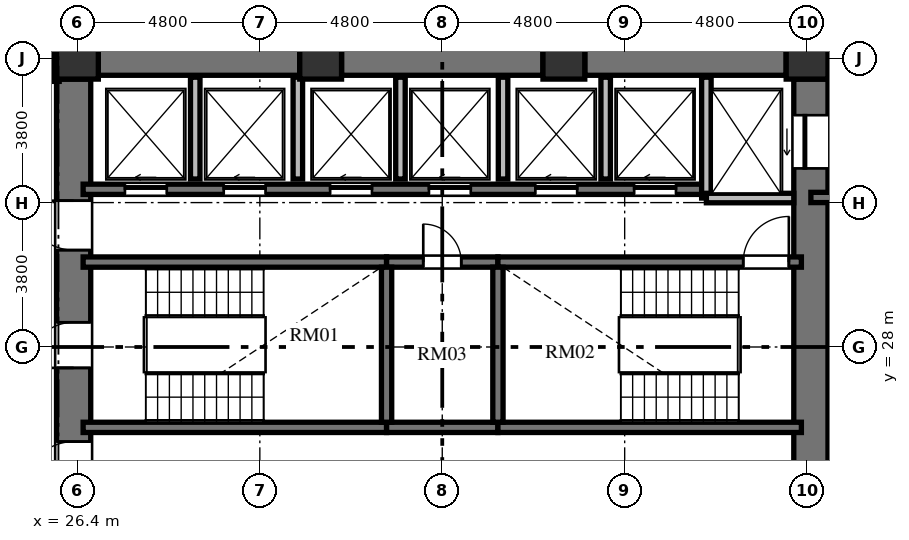
"""IFC4 building model, lengths in metres.
Left out: names, types, materials, properties, quantities, classifications, styles, units other than length and angle.
Written with IfcOpenShell. Run it as: python <this file> out.ifc"""

import sys

from ifc_helpers import new_model, si_unit, direction, frame, frame_2d, origin, origin_2d, place, context, subcontext, project, spatial, rectangle, extrude, element, fill, save


model = new_model("IFC4")
c1 = context("Model", 3, precision=1e-05, world=origin(), true_north=direction((0.0, 1.0)))
c2 = subcontext(c1, "Body", "Model", "MODEL_VIEW")
j1 = project(units=[si_unit("LENGTHUNIT", "METRE"), si_unit("PLANEANGLEUNIT", "RADIAN")], contexts=[c1])
p1 = place(None, origin())
s1 = spatial("IfcSite", under=j1, at=p1, CompositionType="ELEMENT")
p2 = place(p1, origin())
s2 = spatial("IfcBuilding", under=s1, at=p2, CompositionType="ELEMENT")
p3 = place(p2, frame((0.0, 0.0, 25.2)))
s3 = spatial("IfcBuildingStorey", under=s2, at=p3, CompositionType="ELEMENT", Elevation=25.2)
for number, where, z_axis, x_axis in (
    (1, (45.6, 35.6, 0.0), (0.0, 0.0, 1.0), (1.0, 0.0, 0.0)),
    (2, (39.2, 35.6, 0.0), (0.0, 0.0, 1.0), (1.0, 0.0, 0.0)),
    (3, (32.8, 35.6, 0.0), (0.0, 0.0, 1.0), (1.0, 0.0, 0.0)),
    (4, (26.4, 35.6, 0.0), (0.0, 0.0, 1.0), (1.0, 0.0, 0.0)),
):
    element("IfcColumn", number, at=place(p3, frame(where, z_axis=z_axis, x_axis=x_axis)), inside=s3, PredefinedType="COLUMN", context=c2, shape_type="SweptSolid", body=[
        extrude(rectangle(XDim=1.1, YDim=1.1, at=origin_2d()), origin(), (0.0, 0.0, 1.0), 3.648),
    ])
p4 = place(p3, frame((26.3, 20.95, 0.0), z_axis=(0.0, 0.0, 1.0), x_axis=(0.0, 1.0, 0.0)))
e5 = element("IfcWall", 5, at=p4, inside=s3, PredefinedType="SHEAR", context=c2, shape_type="SweptSolid", body=[
    extrude(rectangle(XDim=14.1, YDim=0.9, at=frame_2d((7.05, 0.0))), origin(), (0.0, 0.0, 1.0), 3.648),
])
p5 = place(p4, frame((6.5, 0.0, 0.0)))
e6 = element("IfcOpeningElement", 6, at=p5, cuts=e5, PredefinedType="OPENING", context=c2, shape_type="SweptSolid", body=[
    extrude(rectangle(XDim=1.2, YDim=2.15, at=frame_2d((0.6, 1.075))), frame((0.0, 0.46, 0.0), z_axis=(0.0, -1.0, 0.0), x_axis=(1.0, 0.0, 0.0)), (0.0, 0.0, 1.0), 0.92),
])
p6 = place(p4, frame((9.6, 0.0, 0.0)))
e7 = element("IfcOpeningElement", 7, at=p6, cuts=e5, PredefinedType="OPENING", context=c2, shape_type="SweptSolid", body=[
    extrude(rectangle(XDim=1.3, YDim=2.2, at=frame_2d((0.65, 1.1))), frame((0.0, 0.46, 0.0), z_axis=(0.0, -1.0, 0.0), x_axis=(1.0, 0.0, 0.0)), (0.0, 0.0, 1.0), 0.92),
])
p7 = place(p4, frame((3.26, 0.0, 0.0)))
e8 = element("IfcOpeningElement", 8, at=p7, cuts=e5, PredefinedType="OPENING", context=c2, shape_type="SweptSolid", body=[
    extrude(rectangle(XDim=1.3, YDim=2.2, at=frame_2d((0.65, 1.1))), frame((0.0, 0.46, 0.0), z_axis=(0.0, -1.0, 0.0), x_axis=(1.0, 0.0, 0.0)), (0.0, 0.0, 1.0), 0.92),
])
p8 = place(p3, frame((45.7, 20.95, 0.0), z_axis=(0.0, 0.0, 1.0), x_axis=(0.0, 1.0, 0.0)))
e9 = element("IfcWall", 9, at=p8, inside=s3, PredefinedType="SHEAR", context=c2, shape_type="SweptSolid", body=[
    extrude(rectangle(XDim=14.1, YDim=0.9, at=frame_2d((7.05, 0.0))), origin(), (0.0, 0.0, 1.0), 3.648),
])
p9 = place(p8, frame((11.75, 0.0, 0.0)))
e10 = element("IfcOpeningElement", 10, at=p9, cuts=e9, PredefinedType="OPENING", context=c2, shape_type="SweptSolid", body=[
    extrude(rectangle(XDim=1.4, YDim=2.3, at=frame_2d((0.7, 1.15))), frame((0.0, 0.46, 0.0), z_axis=(0.0, -1.0, 0.0), x_axis=(1.0, 0.0, 0.0)), (0.0, 0.0, 1.0), 0.92),
])
p10 = place(p8, frame((0.95, 0.0, 0.0)))
e11 = element("IfcOpeningElement", 11, at=p10, cuts=e9, PredefinedType="OPENING", context=c2, shape_type="SweptSolid", body=[
    extrude(rectangle(XDim=1.4, YDim=2.3, at=frame_2d((0.7, 1.15))), frame((0.0, 0.46, 0.0), z_axis=(0.0, -1.0, 0.0), x_axis=(1.0, 0.0, 0.0)), (0.0, 0.0, 1.0), 0.92),
])
p11 = place(p3, frame((26.95, 35.6, 0.0), z_axis=(0.0, 0.0, 1.0), x_axis=(1.0, 0.0, 0.0)))
e12 = element("IfcWall", 12, at=p11, inside=s3, PredefinedType="SHEAR", context=c2, shape_type="SweptSolid", body=[
    extrude(rectangle(XDim=5.3, YDim=0.9, at=frame_2d((2.65, 0.0))), origin(), (0.0, 0.0, 1.0), 3.648),
])
p12 = place(p3, frame((33.35, 35.6, 0.0), z_axis=(0.0, 0.0, 1.0), x_axis=(1.0, 0.0, 0.0)))
e13 = element("IfcWall", 13, at=p12, inside=s3, PredefinedType="SHEAR", context=c2, shape_type="SweptSolid", body=[
    extrude(rectangle(XDim=5.3, YDim=0.9, at=frame_2d((2.65, 0.0))), origin(), (0.0, 0.0, 1.0), 3.648),
])
p13 = place(p3, frame((39.75, 35.6, 0.0), z_axis=(0.0, 0.0, 1.0), x_axis=(1.0, 0.0, 0.0)))
e14 = element("IfcWall", 14, at=p13, inside=s3, PredefinedType="SHEAR", context=c2, shape_type="SweptSolid", body=[
    extrude(rectangle(XDim=5.3, YDim=0.9, at=frame_2d((2.65, 0.0))), origin(), (0.0, 0.0, 1.0), 3.648),
])
p14 = place(p3, frame((26.55, 30.235, 0.0), z_axis=(0.0, 0.0, 1.0), x_axis=(1.0, 0.0, 0.0)))
e15 = element("IfcWall", 15, at=p14, inside=s3, PredefinedType="SHEAR", context=c2, shape_type="SweptSolid", body=[
    extrude(rectangle(XDim=7.985, YDim=0.27, at=frame_2d((3.992, 0.0))), origin(), (0.0, 0.0, 1.0), 3.648),
])
p15 = place(p3, frame((34.535, 30.235, 0.0), z_axis=(0.0, 0.0, 1.0), x_axis=(1.0, 0.0, 0.0)))
e16 = element("IfcWall", 16, at=p15, inside=s3, PredefinedType="SHEAR", context=c2, shape_type="SweptSolid", body=[
    extrude(rectangle(XDim=2.93, YDim=0.27, at=frame_2d((1.465, 0.0))), origin(), (0.0, 0.0, 1.0), 3.648),
])
p16 = place(p15, frame((0.965, 0.0, 0.0)))
e17 = element("IfcOpeningElement", 17, at=p16, cuts=e16, PredefinedType="OPENING", context=c2, shape_type="SweptSolid", body=[
    extrude(rectangle(XDim=1.0, YDim=2.1, at=frame_2d((0.5, 1.05))), frame((0.0, 0.145, 0.0), z_axis=(0.0, -1.0, 0.0), x_axis=(1.0, 0.0, 0.0)), (0.0, 0.0, 1.0), 0.29),
])
p17 = place(p3, frame((37.465, 30.235, 0.0), z_axis=(0.0, 0.0, 1.0), x_axis=(1.0, 0.0, 0.0)))
e18 = element("IfcWall", 18, at=p17, inside=s3, PredefinedType="SHEAR", context=c2, shape_type="SweptSolid", body=[
    extrude(rectangle(XDim=7.985, YDim=0.27, at=frame_2d((3.992, 0.0))), origin(), (0.0, 0.0, 1.0), 3.648),
])
p18 = place(p17, frame((6.455, 0.0, 0.0)))
e19 = element("IfcOpeningElement", 19, at=p18, cuts=e18, PredefinedType="OPENING", context=c2, shape_type="SweptSolid", body=[
    extrude(rectangle(XDim=1.2, YDim=2.15, at=frame_2d((0.6, 1.075))), frame((0.0, 0.145, 0.0), z_axis=(0.0, -1.0, 0.0), x_axis=(1.0, 0.0, 0.0)), (0.0, 0.0, 1.0), 0.29),
])
p19 = place(p3, frame((26.55, 25.885, 0.0), z_axis=(0.0, 0.0, 1.0), x_axis=(1.0, 0.0, 0.0)))
e20 = element("IfcWall", 20, at=p19, inside=s3, PredefinedType="SHEAR", context=c2, shape_type="SweptSolid", body=[
    extrude(rectangle(XDim=7.985, YDim=0.27, at=frame_2d((3.992, 0.0))), origin(), (0.0, 0.0, 1.0), 3.648),
])
p20 = place(p3, frame((34.535, 25.885, 0.0), z_axis=(0.0, 0.0, 1.0), x_axis=(1.0, 0.0, 0.0)))
e21 = element("IfcWall", 21, at=p20, inside=s3, PredefinedType="SHEAR", context=c2, shape_type="SweptSolid", body=[
    extrude(rectangle(XDim=2.93, YDim=0.27, at=frame_2d((1.465, 0.0))), origin(), (0.0, 0.0, 1.0), 3.648),
])
p21 = place(p3, frame((37.465, 25.885, 0.0), z_axis=(0.0, 0.0, 1.0), x_axis=(1.0, 0.0, 0.0)))
e22 = element("IfcWall", 22, at=p21, inside=s3, PredefinedType="SHEAR", context=c2, shape_type="SweptSolid", body=[
    extrude(rectangle(XDim=7.985, YDim=0.27, at=frame_2d((3.992, 0.0))), origin(), (0.0, 0.0, 1.0), 3.648),
])
for number, where, z_axis, x_axis in (
    (23, (34.535, 26.02, 0.0), (0.0, 0.0, 1.0), (0.0, 1.0, 0.0)),
    (24, (37.465, 26.02, 0.0), (0.0, 0.0, 1.0), (0.0, 1.0, 0.0)),
):
    element("IfcWall", number, at=place(p3, frame(where, z_axis=z_axis, x_axis=x_axis)), inside=s3, PredefinedType="SHEAR", context=c2, shape_type="SweptSolid", body=[
        extrude(rectangle(XDim=4.08, YDim=0.27, at=frame_2d((2.04, 0.0))), origin(), (0.0, 0.0, 1.0), 3.648),
    ])
p22 = place(p3, frame((26.55, 32.15, 0.0), z_axis=(0.0, 0.0, 1.0), x_axis=(1.0, 0.0, 0.0)))
e25 = element("IfcWall", 25, at=p22, inside=s3, PredefinedType="SHEAR", context=c2, shape_type="SweptSolid", body=[
    extrude(rectangle(XDim=16.4, YDim=0.27, at=frame_2d((8.2, 0.0))), origin(), (0.0, 0.0, 1.0), 3.648),
])
p23 = place(p22, frame((1.1, 0.0, 0.0)))
e26 = element("IfcOpeningElement", 26, at=p23, cuts=e25, PredefinedType="OPENING", context=c2, shape_type="SweptSolid", body=[
    extrude(rectangle(XDim=1.1, YDim=2.2, at=frame_2d((0.55, 1.1))), frame((0.0, 0.145, 0.0), z_axis=(0.0, -1.0, 0.0), x_axis=(1.0, 0.0, 0.0)), (0.0, 0.0, 1.0), 0.29),
])
p24 = place(p22, frame((3.7, 0.0, 0.0)))
e27 = element("IfcOpeningElement", 27, at=p24, cuts=e25, PredefinedType="OPENING", context=c2, shape_type="SweptSolid", body=[
    extrude(rectangle(XDim=1.1, YDim=2.2, at=frame_2d((0.55, 1.1))), frame((0.0, 0.145, 0.0), z_axis=(0.0, -1.0, 0.0), x_axis=(1.0, 0.0, 0.0)), (0.0, 0.0, 1.0), 0.29),
])
p25 = place(p22, frame((6.5, 0.0, 0.0)))
e28 = element("IfcOpeningElement", 28, at=p25, cuts=e25, PredefinedType="OPENING", context=c2, shape_type="SweptSolid", body=[
    extrude(rectangle(XDim=1.1, YDim=2.2, at=frame_2d((0.55, 1.1))), frame((0.0, 0.145, 0.0), z_axis=(0.0, -1.0, 0.0), x_axis=(1.0, 0.0, 0.0)), (0.0, 0.0, 1.0), 0.29),
])
p26 = place(p22, frame((9.1, 0.0, 0.0)))
e29 = element("IfcOpeningElement", 29, at=p26, cuts=e25, PredefinedType="OPENING", context=c2, shape_type="SweptSolid", body=[
    extrude(rectangle(XDim=1.1, YDim=2.2, at=frame_2d((0.55, 1.1))), frame((0.0, 0.145, 0.0), z_axis=(0.0, -1.0, 0.0), x_axis=(1.0, 0.0, 0.0)), (0.0, 0.0, 1.0), 0.29),
])
p27 = place(p22, frame((11.9, 0.0, 0.0)))
e30 = element("IfcOpeningElement", 30, at=p27, cuts=e25, PredefinedType="OPENING", context=c2, shape_type="SweptSolid", body=[
    extrude(rectangle(XDim=1.1, YDim=2.2, at=frame_2d((0.55, 1.1))), frame((0.0, 0.145, 0.0), z_axis=(0.0, -1.0, 0.0), x_axis=(1.0, 0.0, 0.0)), (0.0, 0.0, 1.0), 0.29),
])
p28 = place(p22, frame((14.5, 0.0, 0.0)))
e31 = element("IfcOpeningElement", 31, at=p28, cuts=e25, PredefinedType="OPENING", context=c2, shape_type="SweptSolid", body=[
    extrude(rectangle(XDim=1.1, YDim=2.2, at=frame_2d((0.55, 1.1))), frame((0.0, 0.145, 0.0), z_axis=(0.0, -1.0, 0.0), x_axis=(1.0, 0.0, 0.0)), (0.0, 0.0, 1.0), 0.29),
])
p29 = place(p3, frame((42.95, 31.92, 0.0), z_axis=(0.0, 0.0, 1.0), x_axis=(0.0, 1.0, 0.0)))
e32 = element("IfcWall", 32, at=p29, inside=s3, PredefinedType="SOLIDWALL", context=c2, shape_type="SweptSolid", body=[
    extrude(rectangle(XDim=3.18, YDim=0.25, at=frame_2d((1.59, 0.0))), origin(), (0.0, 0.0, 1.0), 3.428),
])
p30 = place(p3, frame((42.95, 31.92, 0.0), z_axis=(0.0, 0.0, 1.0), x_axis=(1.0, 0.0, 0.0)))
e33 = element("IfcWall", 33, at=p30, inside=s3, PredefinedType="SOLIDWALL", context=c2, shape_type="SweptSolid", body=[
    extrude(rectangle(XDim=2.3, YDim=0.25, at=frame_2d((1.15, 0.0))), origin(), (0.0, 0.0, 1.0), 3.428),
])
for number, where, z_axis, x_axis in (
    (34, (29.5, 32.42, 0.0), (0.0, 0.0, 1.0), (0.0, 1.0, 0.0)),
    (35, (32.2, 32.42, 0.0), (0.0, 0.0, 1.0), (0.0, 1.0, 0.0)),
    (36, (34.9, 32.42, 0.0), (0.0, 0.0, 1.0), (0.0, 1.0, 0.0)),
    (37, (37.6, 32.42, 0.0), (0.0, 0.0, 1.0), (0.0, 1.0, 0.0)),
    (38, (40.3, 32.42, 0.0), (0.0, 0.0, 1.0), (0.0, 1.0, 0.0)),
):
    element("IfcWall", number, at=place(p3, frame(where, z_axis=z_axis, x_axis=x_axis)), inside=s3, PredefinedType="SOLIDWALL", context=c2, shape_type="SweptSolid", body=[
        extrude(rectangle(XDim=2.68, YDim=0.25, at=frame_2d((1.34, 0.0))), origin(), (0.0, 0.0, 1.0), 3.428),
    ])
p31 = place(p3, frame((45.7, 31.935, 0.0), z_axis=(0.0, 0.0, 1.0), x_axis=(1.0, 0.0, 0.0)))
e39 = element("IfcWall", 39, at=p31, inside=s3, PredefinedType="SHEAR", context=c2, shape_type="SweptSolid", body=[
    extrude(rectangle(XDim=4.715, YDim=0.27, at=frame_2d((2.357, 0.0))), origin(), (0.0, 0.0, 1.0), 3.648),
])
p32 = place(p3, frame((25.83, 36.21, 0.0), z_axis=(0.0, 0.0, 1.0), x_axis=(0.0, -1.0, 0.0)))
e40 = element("IfcWall", 40, at=p32, inside=s3, PredefinedType="PARTITIONING", context=c2, shape_type="SweptSolid", body=[
    extrude(rectangle(XDim=1.22, YDim=0.18, at=frame_2d((0.61, 0.0))), origin(), (0.0, 0.0, 1.0), 3.428),
])
p33 = place(p5, origin())
e41 = element("IfcDoor", 41, at=p33, inside=s3, OperationType="SINGLE_SWING_LEFT", PredefinedType="DOOR", context=c2, shape_type="SweptSolid", body=[
    extrude(rectangle(XDim=1.2, YDim=2.15, at=frame_2d((0.6, 1.075))), frame((0.0, 0.025, 0.0), z_axis=(0.0, -1.0, 0.0), x_axis=(1.0, 0.0, 0.0)), (0.0, 0.0, 1.0), 0.05),
])
fill(e6, e41)
p34 = place(p18, origin())
e42 = element("IfcDoor", 42, at=p34, inside=s3, OperationType="SINGLE_SWING_RIGHT", PredefinedType="DOOR", context=c2, shape_type="SweptSolid", body=[
    extrude(rectangle(XDim=1.2, YDim=2.15, at=frame_2d((0.6, 1.075))), frame((0.0, 0.025, 0.0), z_axis=(0.0, -1.0, 0.0), x_axis=(1.0, 0.0, 0.0)), (0.0, 0.0, 1.0), 0.05),
])
fill(e19, e42)
p35 = place(p16, origin())
e43 = element("IfcDoor", 43, at=p35, inside=s3, OperationType="SINGLE_SWING_LEFT", PredefinedType="DOOR", context=c2, shape_type="SweptSolid", body=[
    extrude(rectangle(XDim=1.0, YDim=2.1, at=frame_2d((0.5, 1.05))), frame((0.0, 0.025, 0.0), z_axis=(0.0, -1.0, 0.0), x_axis=(1.0, 0.0, 0.0)), (0.0, 0.0, 1.0), 0.05),
])
fill(e17, e43)
p36 = place(p6, origin())
e44 = element("IfcDoor", 44, at=p36, inside=s3, OperationType="SINGLE_SWING_RIGHT", PredefinedType="DOOR", context=c2, shape_type="SweptSolid", body=[
    extrude(rectangle(XDim=1.3, YDim=2.2, at=frame_2d((0.65, 1.1))), frame((0.0, 0.025, 0.0), z_axis=(0.0, -1.0, 0.0), x_axis=(1.0, 0.0, 0.0)), (0.0, 0.0, 1.0), 0.05),
])
fill(e7, e44)
p37 = place(p7, origin())
e45 = element("IfcDoor", 45, at=p37, inside=s3, OperationType="SINGLE_SWING_LEFT", PredefinedType="DOOR", context=c2, shape_type="SweptSolid", body=[
    extrude(rectangle(XDim=1.3, YDim=2.2, at=frame_2d((0.65, 1.1))), frame((0.0, 0.025, 0.0), z_axis=(0.0, -1.0, 0.0), x_axis=(1.0, 0.0, 0.0)), (0.0, 0.0, 1.0), 0.05),
])
fill(e8, e45)
p38 = place(p23, origin())
e46 = element("IfcDoor", 46, at=p38, inside=s3, OperationType="SLIDING_TO_LEFT", PredefinedType="DOOR", context=c2, shape_type="SweptSolid", body=[
    extrude(rectangle(XDim=1.1, YDim=2.2, at=frame_2d((0.55, 1.1))), frame((0.0, 0.025, 0.0), z_axis=(0.0, -1.0, 0.0), x_axis=(1.0, 0.0, 0.0)), (0.0, 0.0, 1.0), 0.05),
])
fill(e26, e46)
p39 = place(p24, origin())
e47 = element("IfcDoor", 47, at=p39, inside=s3, OperationType="SLIDING_TO_LEFT", PredefinedType="DOOR", context=c2, shape_type="SweptSolid", body=[
    extrude(rectangle(XDim=1.1, YDim=2.2, at=frame_2d((0.55, 1.1))), frame((0.0, 0.025, 0.0), z_axis=(0.0, -1.0, 0.0), x_axis=(1.0, 0.0, 0.0)), (0.0, 0.0, 1.0), 0.05),
])
fill(e27, e47)
p40 = place(p25, origin())
e48 = element("IfcDoor", 48, at=p40, inside=s3, OperationType="SLIDING_TO_LEFT", PredefinedType="DOOR", context=c2, shape_type="SweptSolid", body=[
    extrude(rectangle(XDim=1.1, YDim=2.2, at=frame_2d((0.55, 1.1))), frame((0.0, 0.025, 0.0), z_axis=(0.0, -1.0, 0.0), x_axis=(1.0, 0.0, 0.0)), (0.0, 0.0, 1.0), 0.05),
])
fill(e28, e48)
p41 = place(p26, origin())
e49 = element("IfcDoor", 49, at=p41, inside=s3, OperationType="SLIDING_TO_LEFT", PredefinedType="DOOR", context=c2, shape_type="SweptSolid", body=[
    extrude(rectangle(XDim=1.1, YDim=2.2, at=frame_2d((0.55, 1.1))), frame((0.0, 0.025, 0.0), z_axis=(0.0, -1.0, 0.0), x_axis=(1.0, 0.0, 0.0)), (0.0, 0.0, 1.0), 0.05),
])
fill(e29, e49)
p42 = place(p27, origin())
e50 = element("IfcDoor", 50, at=p42, inside=s3, OperationType="SLIDING_TO_LEFT", PredefinedType="DOOR", context=c2, shape_type="SweptSolid", body=[
    extrude(rectangle(XDim=1.1, YDim=2.2, at=frame_2d((0.55, 1.1))), frame((0.0, 0.025, 0.0), z_axis=(0.0, -1.0, 0.0), x_axis=(1.0, 0.0, 0.0)), (0.0, 0.0, 1.0), 0.05),
])
fill(e30, e50)
p43 = place(p28, origin())
e51 = element("IfcDoor", 51, at=p43, inside=s3, OperationType="SLIDING_TO_LEFT", PredefinedType="DOOR", context=c2, shape_type="SweptSolid", body=[
    extrude(rectangle(XDim=1.1, YDim=2.2, at=frame_2d((0.55, 1.1))), frame((0.0, 0.025, 0.0), z_axis=(0.0, -1.0, 0.0), x_axis=(1.0, 0.0, 0.0)), (0.0, 0.0, 1.0), 0.05),
])
fill(e31, e51)
p44 = place(p9, origin())
e52 = element("IfcDoor", 52, at=p44, inside=s3, OperationType="SLIDING_TO_LEFT", PredefinedType="DOOR", context=c2, shape_type="SweptSolid", body=[
    extrude(rectangle(XDim=1.4, YDim=2.3, at=frame_2d((0.7, 1.15))), frame((0.0, 0.025, 0.0), z_axis=(0.0, -1.0, 0.0), x_axis=(1.0, 0.0, 0.0)), (0.0, 0.0, 1.0), 0.05),
])
fill(e10, e52)
save(model, sys.argv[1])
